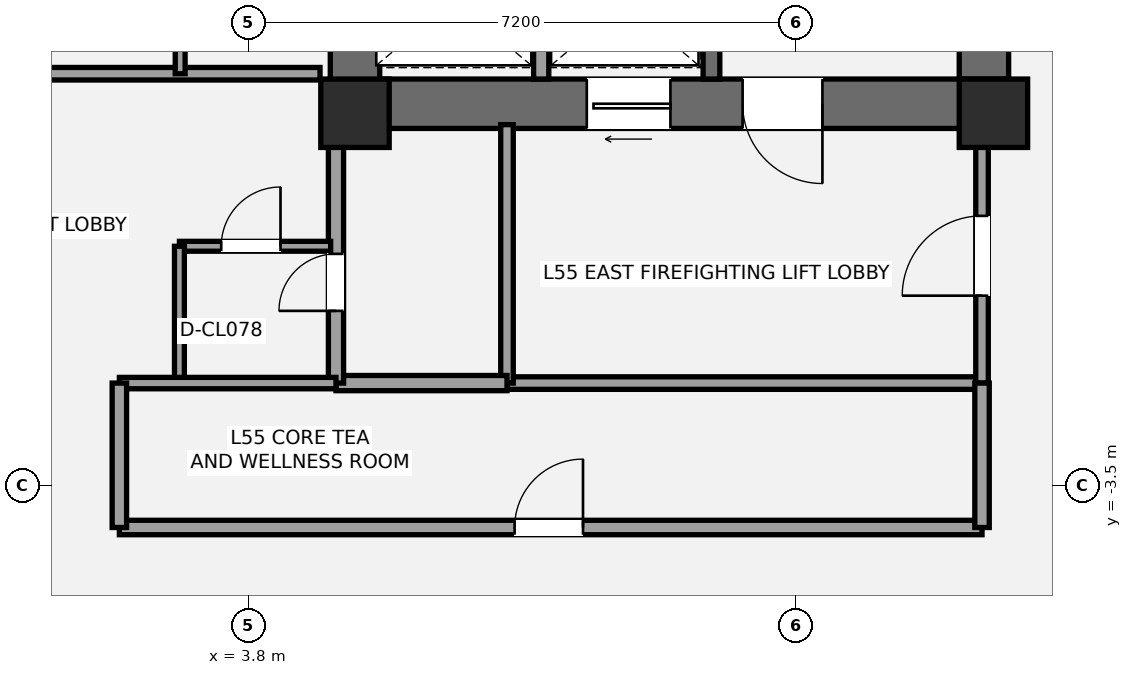
"""IFC4 building model, lengths in metres.
Left out: names, types, materials, properties, quantities, classifications, styles, units other than length and angle.
Written with IfcOpenShell. Run it as: python <this file> out.ifc"""

import sys

from ifc_helpers import new_model, si_unit, direction, frame, frame_2d, origin, origin_2d, place, context, subcontext, project, spatial, rectangle, extrude, element, fill, save


model = new_model("IFC4")
c1 = context("Model", 3, precision=1e-05, world=origin(), true_north=direction((0.0, 1.0)))
c2 = subcontext(c1, "Body", "Model", "MODEL_VIEW")
j1 = project(units=[si_unit("LENGTHUNIT", "METRE"), si_unit("PLANEANGLEUNIT", "RADIAN")], contexts=[c1])
p1 = place(None, origin())
s1 = spatial("IfcSite", under=j1, at=p1, CompositionType="ELEMENT")
p2 = place(p1, origin())
s2 = spatial("IfcBuilding", under=s1, at=p2, CompositionType="ELEMENT")
p3 = place(p2, frame((0.0, 0.0, 198.2)))
s3 = spatial("IfcBuildingStorey", under=s2, at=p3, CompositionType="ELEMENT", Elevation=198.2)
p4 = place(p3, frame((13.475, 1.2, 0.0), z_axis=(0.0, 0.0, 1.0), x_axis=(0.0, 1.0, 0.0)))
e1 = element("IfcWall", 1, at=p4, inside=s3, PredefinedType="SHEAR", context=c2, shape_type="SweptSolid", body=[
    extrude(rectangle(XDim=8.45, YDim=0.65, at=frame_2d((4.225, 0.0))), origin(), (0.0, 0.0, 1.0), 3.2),
])
p5 = place(p3, frame((13.8, 1.525, 0.0), z_axis=(0.0, 0.0, 1.0), x_axis=(-1.0, 0.0, 0.0)))
e2 = element("IfcWall", 2, at=p5, inside=s3, PredefinedType="SHEAR", context=c2, shape_type="SweptSolid", body=[
    extrude(rectangle(XDim=8.925, YDim=0.65, at=frame_2d((4.462, 0.0))), origin(), (0.0, 0.0, 1.0), 3.2),
])
p6 = place(p5, frame((2.45, 0.0, 0.0)))
e3 = element("IfcOpeningElement", 3, at=p6, cuts=e2, PredefinedType="OPENING", context=c2, shape_type="SweptSolid", body=[
    extrude(rectangle(XDim=1.05, YDim=2.15, at=frame_2d((0.525, 1.075))), frame((0.0, 0.335, 0.0), z_axis=(0.0, -1.0, 0.0), x_axis=(1.0, 0.0, 0.0)), (0.0, 0.0, 1.0), 0.67),
])
p7 = place(p5, frame((4.45, 0.0, 0.0)))
e4 = element("IfcOpeningElement", 4, at=p7, cuts=e2, PredefinedType="OPENING", context=c2, shape_type="SweptSolid", body=[
    extrude(rectangle(XDim=1.1, YDim=2.2, at=frame_2d((0.55, 1.1))), frame((0.0, 0.335, 0.0), z_axis=(0.0, -1.0, 0.0), x_axis=(1.0, 0.0, 0.0)), (0.0, 0.0, 1.0), 0.67),
])
p8 = place(p3, frame((5.2, 1.2, 0.0), z_axis=(0.0, 0.0, 1.0), x_axis=(0.0, 1.0, 0.0)))
e5 = element("IfcWall", 5, at=p8, inside=s3, PredefinedType="SHEAR", context=c2, shape_type="SweptSolid", body=[
    extrude(rectangle(XDim=2.6, YDim=0.65, at=frame_2d((1.3, 0.0))), origin(), (0.0, 0.0, 1.0), 3.2),
])
p9 = place(p3, frame((9.89, 1.85, 0.0), z_axis=(0.0, 0.0, 1.0), x_axis=(0.0, 1.0, 0.0)))
e6 = element("IfcWall", 6, at=p9, inside=s3, PredefinedType="SHEAR", context=c2, shape_type="SweptSolid", body=[
    extrude(rectangle(XDim=7.15, YDim=0.22, at=frame_2d((3.575, 0.0))), origin(), (0.0, 0.0, 1.0), 3.2),
])
for number, where, z_axis, x_axis in (
    (7, (5.2, 1.4, 0.0), (0.0, 0.0, 1.0), (1.0, 0.0, 0.0)),
    (8, (13.6, 1.4, 0.0), (0.0, 0.0, 1.0), (1.0, 0.0, 0.0)),
):
    element("IfcColumn", number, at=place(p3, frame(where, z_axis=z_axis, x_axis=x_axis)), inside=s3, PredefinedType="COLUMN", context=c2, shape_type="SweptSolid", body=[
        extrude(rectangle(XDim=0.9, YDim=0.9, at=origin_2d()), origin(), (0.0, 0.0, 1.0), 3.2),
    ])
p10 = place(p3, frame((7.2, -2.15, 0.0), z_axis=(0.0, 0.0, 1.0), x_axis=(1.0, 0.0, 0.0)))
e9 = element("IfcWall", 9, at=p10, inside=s3, PredefinedType="PARTITIONING", context=c2, shape_type="SweptSolid", body=[
    extrude(rectangle(XDim=6.25, YDim=0.165, at=frame_2d((3.125, 0.0))), origin(), (0.0, 0.0, 1.0), 2.96),
])
p11 = place(p3, frame((7.2, -2.15, 0.0), z_axis=(0.0, 0.0, 1.0), x_axis=(0.0, 1.0, 0.0)))
e10 = element("IfcWall", 10, at=p11, inside=s3, PredefinedType="PARTITIONING", context=c2, shape_type="SweptSolid", body=[
    extrude(rectangle(XDim=3.4, YDim=0.165, at=frame_2d((1.7, 0.0))), origin(), (0.0, 0.0, 1.0), 2.413),
])
p12 = place(p3, frame((13.45, -2.15, 0.0), z_axis=(0.0, 0.0, 1.0), x_axis=(0.0, 1.0, 0.0)))
e11 = element("IfcWall", 11, at=p12, inside=s3, PredefinedType="PARTITIONING", context=c2, shape_type="SweptSolid", body=[
    extrude(rectangle(XDim=3.4, YDim=0.165, at=frame_2d((1.7, 0.0))), origin(), (0.0, 0.0, 1.0), 2.413),
])
p13 = place(p12, frame((1.15, 0.0, 0.0)))
e12 = element("IfcOpeningElement", 12, at=p13, cuts=e11, PredefinedType="OPENING", context=c2, shape_type="SweptSolid", body=[
    extrude(rectangle(XDim=1.05, YDim=2.15, at=frame_2d((0.525, 1.075))), frame((0.0, 0.093, 0.0), z_axis=(0.0, -1.0, 0.0), x_axis=(1.0, 0.0, 0.0)), (0.0, 0.0, 1.0), 0.185),
])
p14 = place(p3, frame((4.95, -2.15, 0.0), z_axis=(0.0, 0.0, 1.0), x_axis=(1.0, 0.0, 0.0)))
e13 = element("IfcWall", 13, at=p14, inside=s3, PredefinedType="SOLIDWALL", context=c2, shape_type="SweptSolid", body=[
    extrude(rectangle(XDim=2.25, YDim=0.2, at=frame_2d((1.125, 0.0))), origin(), (0.0, 0.0, 1.0), 2.96),
])
p15 = place(p3, frame((4.95, -2.15, 0.0), z_axis=(0.0, 0.0, 1.0), x_axis=(0.0, 1.0, 0.0)))
e14 = element("IfcWall", 14, at=p15, inside=s3, PredefinedType="SOLIDWALL", context=c2, shape_type="SweptSolid", body=[
    extrude(rectangle(XDim=3.4, YDim=0.2, at=frame_2d((1.7, 0.0))), origin(), (0.0, 0.0, 1.0), 2.413),
])
p16 = place(p15, frame((0.95, 0.0, 0.0)))
e15 = element("IfcOpeningElement", 15, at=p16, cuts=e14, PredefinedType="OPENING", context=c2, shape_type="SweptSolid", body=[
    extrude(rectangle(XDim=0.75, YDim=2.1, at=frame_2d((0.375, 1.05))), frame((0.0, 0.11, 0.0), z_axis=(0.0, -1.0, 0.0), x_axis=(1.0, 0.0, 0.0)), (0.0, 0.0, 1.0), 0.22),
])
p17 = place(p3, frame((2.89, -0.35, 0.0), z_axis=(0.0, 0.0, 1.0), x_axis=(1.0, 0.0, 0.0)))
e16 = element("IfcWall", 16, at=p17, inside=s3, PredefinedType="PARTITIONING", context=c2, shape_type="SweptSolid", body=[
    extrude(rectangle(XDim=1.99, YDim=0.13, at=frame_2d((0.995, 0.0))), origin(), (0.0, 0.0, 1.0), 2.96),
])
p18 = place(p17, frame((0.55, 0.0, 0.0)))
e17 = element("IfcOpeningElement", 17, at=p18, cuts=e16, PredefinedType="OPENING", context=c2, shape_type="SweptSolid", body=[
    extrude(rectangle(XDim=0.78, YDim=2.1, at=frame_2d((0.39, 1.05))), frame((0.0, 0.075, 0.0), z_axis=(0.0, -1.0, 0.0), x_axis=(1.0, 0.0, 0.0)), (0.0, 0.0, 1.0), 0.15),
])
p19 = place(p3, frame((2.89, -2.15, 0.0), z_axis=(0.0, 0.0, 1.0), x_axis=(0.0, 1.0, 0.0)))
e18 = element("IfcWall", 18, at=p19, inside=s3, PredefinedType="PARTITIONING", context=c2, shape_type="SweptSolid", body=[
    extrude(rectangle(XDim=1.8, YDim=0.13, at=frame_2d((0.9, 0.0))), origin(), (0.0, 0.0, 1.0), 2.96),
])
p20 = place(p3, frame((7.65, 1.85, 0.0), z_axis=(0.0, 0.0, 1.0), x_axis=(0.0, 1.0, 0.0)))
e19 = element("IfcWall", 19, at=p20, inside=s3, PredefinedType="SOLIDWALL", context=c2, shape_type="SweptSolid", body=[
    extrude(rectangle(XDim=1.97, YDim=0.2, at=frame_2d((0.985, 0.0))), origin(), (0.0, 0.0, 1.0), 2.96),
])
p21 = place(p3, frame((0.85, 1.92, 0.0), z_axis=(0.0, 0.0, 1.0), x_axis=(1.0, 0.0, 0.0)))
e20 = element("IfcWall", 20, at=p21, inside=s3, PredefinedType="PARTITIONING", context=c2, shape_type="SweptSolid", body=[
    extrude(rectangle(XDim=3.89, YDim=0.165, at=frame_2d((1.945, 0.0))), origin(), (0.0, 0.0, 1.0), 2.1),
])
p22 = place(p3, frame((2.9, 1.92, 0.0), z_axis=(0.0, 0.0, 1.0), x_axis=(0.0, 1.0, 0.0)))
e21 = element("IfcWall", 21, at=p22, inside=s3, PredefinedType="PARTITIONING", context=c2, shape_type="SweptSolid", body=[
    extrude(rectangle(XDim=1.82, YDim=0.13, at=frame_2d((0.91, 0.0))), origin(), (0.0, 0.0, 1.0), 2.96),
])
p23 = place(p3, frame((2.1, -4.05, 0.0), z_axis=(0.0, 0.0, 1.0), x_axis=(1.0, 0.0, 0.0)))
e22 = element("IfcWall", 22, at=p23, inside=s3, PredefinedType="PLUMBINGWALL", context=c2, shape_type="SweptSolid", body=[
    extrude(rectangle(XDim=11.35, YDim=0.19, at=frame_2d((5.675, 0.0))), origin(), (0.0, 0.0, 1.0), 2.413),
])
p24 = place(p23, frame((5.2, 0.0, 0.0)))
e23 = element("IfcOpeningElement", 23, at=p24, cuts=e22, PredefinedType="OPENING", context=c2, shape_type="SweptSolid", body=[
    extrude(rectangle(XDim=0.9, YDim=2.1, at=frame_2d((0.45, 1.05))), frame((0.0, 0.105, 0.0), z_axis=(0.0, -1.0, 0.0), x_axis=(1.0, 0.0, 0.0)), (0.0, 0.0, 1.0), 0.21),
])
p25 = place(p3, frame((2.1, -2.15, 0.0), z_axis=(0.0, 0.0, 1.0), x_axis=(1.0, 0.0, 0.0)))
e24 = element("IfcWall", 24, at=p25, inside=s3, PredefinedType="PLUMBINGWALL", context=c2, shape_type="SweptSolid", body=[
    extrude(rectangle(XDim=2.85, YDim=0.15, at=frame_2d((1.425, 0.0))), origin(), (0.0, 0.0, 1.0), 2.413),
])
p26 = place(p3, frame((2.1, -4.05, 0.0), z_axis=(0.0, 0.0, 1.0), x_axis=(0.0, 1.0, 0.0)))
e25 = element("IfcWall", 25, at=p26, inside=s3, PredefinedType="PLUMBINGWALL", context=c2, shape_type="SweptSolid", body=[
    extrude(rectangle(XDim=1.9, YDim=0.19, at=frame_2d((0.95, 0.0))), origin(), (0.0, 0.0, 1.0), 2.96),
])
p27 = place(p3, frame((13.45, -4.05, 0.0), z_axis=(0.0, 0.0, 1.0), x_axis=(0.0, 1.0, 0.0)))
e26 = element("IfcWall", 26, at=p27, inside=s3, PredefinedType="PLUMBINGWALL", context=c2, shape_type="SweptSolid", body=[
    extrude(rectangle(XDim=1.9, YDim=0.19, at=frame_2d((0.95, 0.0))), origin(), (0.0, 0.0, 1.0), 2.413),
])
p28 = place(p6, origin())
e27 = element("IfcDoor", 27, at=p28, inside=s3, OperationType="SINGLE_SWING_LEFT", PredefinedType="DOOR", context=c2, shape_type="SweptSolid", body=[
    extrude(rectangle(XDim=1.05, YDim=2.15, at=frame_2d((0.525, 1.075))), frame((0.0, 0.025, 0.0), z_axis=(0.0, -1.0, 0.0), x_axis=(1.0, 0.0, 0.0)), (0.0, 0.0, 1.0), 0.05),
])
fill(e3, e27)
p29 = place(p13, origin())
e28 = element("IfcDoor", 28, at=p29, inside=s3, OperationType="SINGLE_SWING_LEFT", PredefinedType="DOOR", context=c2, shape_type="SweptSolid", body=[
    extrude(rectangle(XDim=1.05, YDim=2.15, at=frame_2d((0.525, 1.075))), frame((0.0, 0.025, 0.0), z_axis=(0.0, -1.0, 0.0), x_axis=(1.0, 0.0, 0.0)), (0.0, 0.0, 1.0), 0.05),
])
fill(e12, e28)
p30 = place(p16, origin())
e29 = element("IfcDoor", 29, at=p30, inside=s3, OperationType="SINGLE_SWING_LEFT", PredefinedType="DOOR", context=c2, shape_type="SweptSolid", body=[
    extrude(rectangle(XDim=0.75, YDim=2.1, at=frame_2d((0.375, 1.05))), frame((0.0, 0.025, 0.0), z_axis=(0.0, -1.0, 0.0), x_axis=(1.0, 0.0, 0.0)), (0.0, 0.0, 1.0), 0.05),
])
fill(e15, e29)
p31 = place(p18, origin())
e30 = element("IfcDoor", 30, at=p31, inside=s3, OperationType="SINGLE_SWING_RIGHT", PredefinedType="DOOR", context=c2, shape_type="SweptSolid", body=[
    extrude(rectangle(XDim=0.78, YDim=2.1, at=frame_2d((0.39, 1.05))), frame((0.0, 0.025, 0.0), z_axis=(0.0, -1.0, 0.0), x_axis=(1.0, 0.0, 0.0)), (0.0, 0.0, 1.0), 0.05),
])
fill(e17, e30)
p32 = place(p7, origin())
e31 = element("IfcDoor", 31, at=p32, inside=s3, OperationType="SLIDING_TO_LEFT", PredefinedType="DOOR", context=c2, shape_type="SweptSolid", body=[
    extrude(rectangle(XDim=1.1, YDim=2.2, at=frame_2d((0.55, 1.1))), frame((0.0, 0.025, 0.0), z_axis=(0.0, -1.0, 0.0), x_axis=(1.0, 0.0, 0.0)), (0.0, 0.0, 1.0), 0.05),
])
fill(e4, e31)
p33 = place(p24, origin())
e32 = element("IfcDoor", 32, at=p33, inside=s3, OperationType="SINGLE_SWING_RIGHT", PredefinedType="DOOR", context=c2, shape_type="SweptSolid", body=[
    extrude(rectangle(XDim=0.9, YDim=2.1, at=frame_2d((0.45, 1.05))), frame((0.0, 0.025, 0.0), z_axis=(0.0, -1.0, 0.0), x_axis=(1.0, 0.0, 0.0)), (0.0, 0.0, 1.0), 0.05),
])
fill(e23, e32)
save(model, sys.argv[1])
